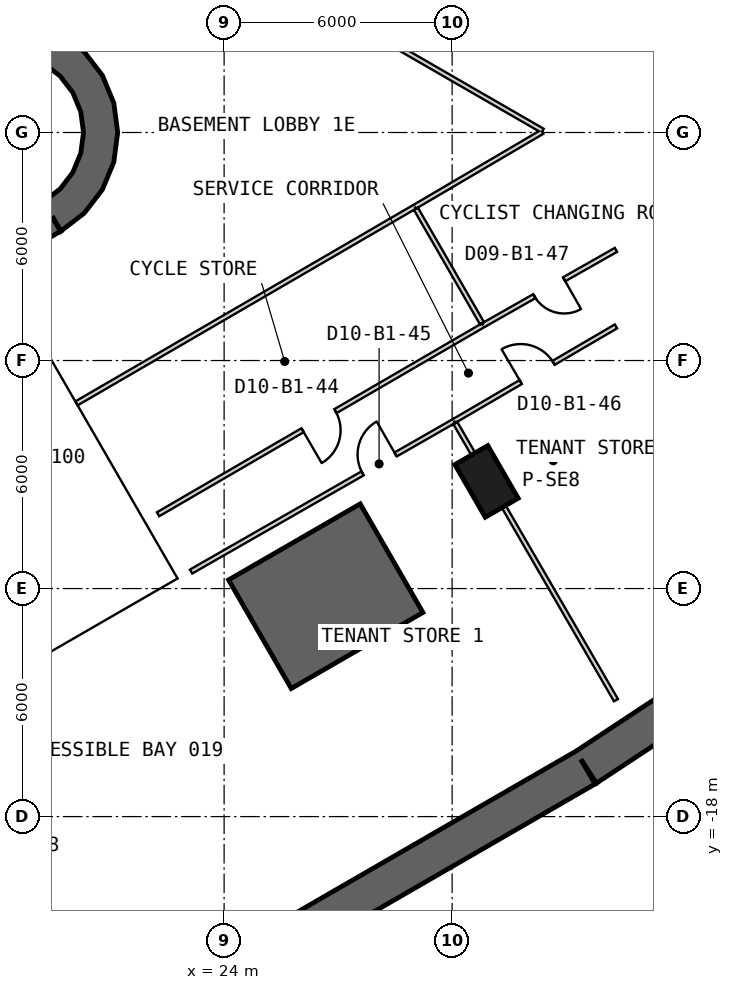
"""IFC4 building model, lengths in metres.
Left out: names, types, materials, properties, quantities, classifications, styles, units other than length and angle.
Written with IfcOpenShell. Run it as: python <this file> out.ifc"""

import sys

from ifc_helpers import new_model, si_unit, direction, frame, frame_2d, origin, origin_2d, place, context, subcontext, project, spatial, polyline, rectangle, outline, extrude, element, fill, save


model = new_model("IFC4")
c1 = context("Model", 3, precision=1e-05, world=origin(), true_north=direction((0.0, 1.0)))
c2 = subcontext(c1, "Body", "Model", "MODEL_VIEW")
j1 = project(units=[si_unit("LENGTHUNIT", "METRE"), si_unit("PLANEANGLEUNIT", "RADIAN")], contexts=[c1])
p1 = place(None, origin())
s1 = spatial("IfcSite", under=j1, at=p1, CompositionType="ELEMENT")
p2 = place(p1, origin())
s2 = spatial("IfcBuilding", under=s1, at=p2, CompositionType="ELEMENT")
p3 = place(p2, frame((0.0, 0.0, -5.5)))
s3 = spatial("IfcBuildingStorey", under=s2, at=p3, CompositionType="ELEMENT", Elevation=-5.5)
p4 = place(p3, frame((45.325, -8.924, 0.0), z_axis=(0.0, 0.0, 1.0), x_axis=(-0.834959286921, -0.550311720014, 0.0)))
e1 = element("IfcWall", 1, at=p4, inside=s3, PredefinedType="SHEAR", context=c2, shape_type="SweptSolid", body=[
    extrude(rectangle(XDim=14.134, YDim=1.0, at=frame_2d((7.067, 0.0))), origin(), (0.0, 0.0, 1.0), 5.5),
])
p5 = place(p3, frame((33.512, -16.71, 0.0), z_axis=(0.0, 0.0, 1.0), x_axis=(-0.865991212225, -0.500059216843, 0.0)))
e2 = element("IfcWall", 2, at=p5, inside=s3, PredefinedType="SHEAR", context=c2, shape_type="SweptSolid", body=[
    extrude(rectangle(XDim=41.333, YDim=1.0, at=frame_2d((20.667, 0.0))), origin(), (0.0, 0.0, 1.0), 5.5),
])
p6 = place(p3, frame((30.905, -9.181, 0.0), z_axis=(0.0, 0.0, 1.0), x_axis=(0.5, -0.866025403784, 0.0)))
e3 = element("IfcColumn", 3, at=p6, inside=s3, PredefinedType="COLUMN", context=c2, shape_type="SweptSolid", body=[
    extrude(rectangle(XDim=1.6, YDim=1.0, at=origin_2d()), origin(), (0.0, 0.0, 1.0), 5.5),
])
p7 = place(p3, frame((19.475, 2.208, 0.0), z_axis=(0.0, 0.0, 1.0), x_axis=(-0.866028369851, 0.499994862586, 0.0)))
e4 = element("IfcWall", 4, at=p7, inside=s3, PredefinedType="SHEAR", context=c2, shape_type="SweptSolid", body=[
    extrude(rectangle(XDim=31.523, YDim=0.9, at=frame_2d((15.762, 0.0))), origin(), (0.0, 0.0, 1.0), 5.5),
])
p8 = place(p7, frame((3.612, 0.0, 0.0)))
e5 = element("IfcOpeningElement", 5, at=p8, cuts=e4, PredefinedType="OPENING", context=c2, shape_type="SweptSolid", body=[
    extrude(rectangle(XDim=1.2, YDim=2.4, at=frame_2d((0.6, 1.2))), frame((0.0, 0.46, 0.0), z_axis=(0.0, -1.0, 0.0), x_axis=(1.0, 0.0, 0.0)), (0.0, 0.0, 1.0), 0.92),
])
p9 = place(p7, frame((26.712, 0.0, 0.0)))
e6 = element("IfcOpeningElement", 6, at=p9, cuts=e4, PredefinedType="OPENING", context=c2, shape_type="SweptSolid", body=[
    extrude(rectangle(XDim=1.2, YDim=2.4, at=frame_2d((0.6, 1.2))), frame((0.0, 0.46, 0.0), z_axis=(0.0, -1.0, 0.0), x_axis=(1.0, 0.0, 0.0)), (0.0, 0.0, 1.0), 0.92),
])
p10 = place(p3, frame((-7.825, -17.97, 0.0), z_axis=(0.0, 0.0, 1.0), x_axis=(0.866028369851, 0.499994862586, 0.0)))
e7 = element("IfcWall", 7, at=p10, inside=s3, PredefinedType="SHEAR", context=c2, shape_type="SweptSolid", body=[
    extrude(rectangle(XDim=31.523, YDim=0.9, at=frame_2d((15.762, 0.0))), origin(), (0.0, 0.0, 1.0), 5.5),
])
p11 = place(p10, frame((17.862, 0.0, 0.0)))
e8 = element("IfcOpeningElement", 8, at=p11, cuts=e7, PredefinedType="OPENING", context=c2, shape_type="SweptSolid", body=[
    extrude(rectangle(XDim=1.2, YDim=2.4, at=frame_2d((0.6, 1.2))), frame((0.0, 0.46, 0.0), z_axis=(0.0, -1.0, 0.0), x_axis=(1.0, 0.0, 0.0)), (0.0, 0.0, 1.0), 0.92),
])
p12 = place(p10, frame((20.562, 0.0, 0.0)))
e9 = element("IfcOpeningElement", 9, at=p12, cuts=e7, PredefinedType="OPENING", context=c2, shape_type="SweptSolid", body=[
    extrude(rectangle(XDim=1.2, YDim=2.4, at=frame_2d((0.6, 1.2))), frame((0.0, 0.46, 0.0), z_axis=(0.0, -1.0, 0.0), x_axis=(1.0, 0.0, 0.0)), (0.0, 0.0, 1.0), 0.92),
])
p13 = place(p10, frame((26.712, 0.0, 0.0)))
e10 = element("IfcOpeningElement", 10, at=p13, cuts=e7, PredefinedType="OPENING", context=c2, shape_type="SweptSolid", body=[
    extrude(rectangle(XDim=1.2, YDim=2.4, at=frame_2d((0.6, 1.2))), frame((0.0, 0.46, 0.0), z_axis=(0.0, -1.0, 0.0), x_axis=(1.0, 0.0, 0.0)), (0.0, 0.0, 1.0), 0.92),
])
p14 = place(p10, frame((3.612, 0.0, 0.0)))
e11 = element("IfcOpeningElement", 11, at=p14, cuts=e7, PredefinedType="OPENING", context=c2, shape_type="SweptSolid", body=[
    extrude(rectangle(XDim=1.2, YDim=2.4, at=frame_2d((0.6, 1.2))), frame((0.0, 0.46, 0.0), z_axis=(0.0, -1.0, 0.0), x_axis=(1.0, 0.0, 0.0)), (0.0, 0.0, 1.0), 0.92),
])
p15 = place(p3, origin())
e12 = element("IfcWall", 12, at=p15, inside=s3, PredefinedType="SHEAR", context=c2, shape_type="SweptSolid", body=[
    extrude(outline(polyline([(19.7, -2.598), (20.321, -2.121), (20.798, -1.5), (21.098, -0.777), (21.2, 0.0), (21.098, 0.777), (20.798, 1.5), (20.321, 2.121), (19.7, 2.598), (19.25, 1.819), (19.685, 1.485), (20.019, 1.05), (20.229, 0.543), (20.3, 0.0), (20.229, -0.543), (20.019, -1.05), (19.685, -1.485), (19.25, -1.819), (19.7, -2.598)])), origin(), (0.0, 0.0, 1.0), 5.5),
])
p16 = place(p3, origin())
e13 = element("IfcWall", 13, at=p16, inside=s3, PredefinedType="SHEAR", context=c2, shape_type="SweptSolid", body=[
    extrude(outline(polyline([(25.767, -14.63), (29.231, -12.63), (27.581, -9.772), (24.117, -11.772), (25.767, -14.63)])), origin(), (0.0, 0.0, 1.0), 5.5),
])
p17 = place(p3, frame((20.115, -7.128, 0.0), z_axis=(0.0, 0.0, 1.0), x_axis=(0.864567321734, 0.502517010847, 0.0)))
e14 = element("IfcWall", 14, at=p17, inside=s3, PredefinedType="PARTITIONING", context=c2, shape_type="SweptSolid", body=[
    extrude(rectangle(XDim=10.296, YDim=0.12, at=frame_2d((5.148, 0.0))), origin(), (0.0, 0.0, 1.0), 4.18),
])
p18 = place(p3, frame((32.38, 0.046, 0.0), z_axis=(0.0, 0.0, 1.0), x_axis=(-0.86611360534, 0.499847199298, 0.0)))
e15 = element("IfcWall", 15, at=p18, inside=s3, PredefinedType="PARTITIONING", context=c2, shape_type="SweptSolid", body=[
    extrude(rectangle(XDim=56.078, YDim=0.12, at=frame_2d((28.039, 0.0))), origin(), (0.0, 0.0, 1.0), 4.07),
])
p19 = place(p18, frame((30.481, 0.0, 0.0)))
e16 = element("IfcOpeningElement", 16, at=p19, cuts=e15, PredefinedType="OPENING", context=c2, shape_type="SweptSolid", body=[
    extrude(rectangle(XDim=1.2, YDim=2.4, at=frame_2d((0.6, 1.2))), frame((0.0, 0.07, 0.0), z_axis=(0.0, -1.0, 0.0), x_axis=(1.0, 0.0, 0.0)), (0.0, 0.0, 1.0), 0.14),
])
p20 = place(p18, frame((10.481, 0.0, 0.0)))
e17 = element("IfcOpeningElement", 17, at=p20, cuts=e15, PredefinedType="OPENING", context=c2, shape_type="SweptSolid", body=[
    extrude(rectangle(XDim=1.2, YDim=2.4, at=frame_2d((0.6, 1.2))), frame((0.0, 0.07, 0.0), z_axis=(0.0, -1.0, 0.0), x_axis=(1.0, 0.0, 0.0)), (0.0, 0.0, 1.0), 0.14),
])
p21 = place(p18, frame((45.282, 0.0, 0.0)))
e18 = element("IfcOpeningElement", 18, at=p21, cuts=e15, PredefinedType="OPENING", context=c2, shape_type="SweptSolid", body=[
    extrude(rectangle(XDim=0.9, YDim=2.1, at=frame_2d((0.45, 1.05))), frame((0.0, 0.07, 0.0), z_axis=(0.0, -1.0, 0.0), x_axis=(1.0, 0.0, 0.0)), (0.0, 0.0, 1.0), 0.14),
])
p22 = place(p18, frame((52.061, 0.0, 0.0)))
e19 = element("IfcOpeningElement", 19, at=p22, cuts=e15, PredefinedType="OPENING", context=c2, shape_type="SweptSolid", body=[
    extrude(rectangle(XDim=1.0, YDim=2.1, at=frame_2d((0.5, 1.05))), frame((0.0, 0.07, 0.0), z_axis=(0.0, -1.0, 0.0), x_axis=(1.0, 0.0, 0.0)), (0.0, 0.0, 1.0), 0.14),
])
p23 = place(p3, frame((29.017, -1.953, 0.0), z_axis=(0.0, 0.0, 1.0), x_axis=(0.86215357335, 0.506647032912, 0.0)))
e20 = element("IfcWall", 20, at=p23, inside=s3, PredefinedType="PARTITIONING", context=c2, shape_type="SweptSolid", body=[
    extrude(rectangle(XDim=3.89, YDim=0.12, at=frame_2d((1.945, 0.0))), origin(), (0.0, 0.0, 1.0), 4.07),
])
p24 = place(p3, frame((30.817, -5.071, 0.0), z_axis=(0.0, 0.0, 1.0), x_axis=(-0.86452239291, -0.502594301756, 0.0)))
e21 = element("IfcWall", 21, at=p24, inside=s3, PredefinedType="PARTITIONING", context=c2, shape_type="SweptSolid", body=[
    extrude(rectangle(XDim=9.896, YDim=0.12, at=frame_2d((4.948, 0.0))), origin(), (0.0, 0.0, 1.0), 4.28),
])
p25 = place(p24, frame((4.496, 0.0, 0.0)))
e22 = element("IfcOpeningElement", 22, at=p25, cuts=e21, PredefinedType="OPENING", context=c2, shape_type="SweptSolid", body=[
    extrude(rectangle(XDim=1.0, YDim=2.1, at=frame_2d((0.5, 1.05))), frame((0.0, 0.07, 0.0), z_axis=(0.0, -1.0, 0.0), x_axis=(1.0, 0.0, 0.0)), (0.0, 0.0, 1.0), 0.14),
])
p26 = place(p3, frame((34.311, -3.088, 0.0), z_axis=(0.0, 0.0, 1.0), x_axis=(-0.869731025912, -0.493526030282, 0.0)))
e23 = element("IfcWall", 23, at=p26, inside=s3, PredefinedType="PARTITIONING", context=c2, shape_type="SweptSolid", body=[
    extrude(rectangle(XDim=4.018, YDim=0.12, at=frame_2d((2.009, 0.0))), origin(), (0.0, 0.0, 1.0), 4.18),
])
p27 = place(p26, frame((1.568, 0.0, 0.0)))
e24 = element("IfcOpeningElement", 24, at=p27, cuts=e23, PredefinedType="OPENING", context=c2, shape_type="SweptSolid", body=[
    extrude(rectangle(XDim=0.9, YDim=2.1, at=frame_2d((0.45, 1.05))), frame((0.0, 0.07, 0.0), z_axis=(0.0, -1.0, 0.0), x_axis=(1.0, 0.0, 0.0)), (0.0, 0.0, 1.0), 0.14),
])
p28 = place(p3, frame((23.131, -11.552, 0.0), z_axis=(0.0, 0.0, 1.0), x_axis=(0.867873663881, 0.496784967106, 0.0)))
e25 = element("IfcWall", 25, at=p28, inside=s3, PredefinedType="PARTITIONING", context=c2, shape_type="SweptSolid", body=[
    extrude(rectangle(XDim=7.975, YDim=0.12, at=frame_2d((3.988, 0.0))), origin(), (0.0, 0.0, 1.0), 4.28),
])
p29 = place(p28, frame((5.2, 0.0, 0.0)))
e26 = element("IfcOpeningElement", 26, at=p29, cuts=e25, PredefinedType="OPENING", context=c2, shape_type="SweptSolid", body=[
    extrude(rectangle(XDim=1.0, YDim=2.1, at=frame_2d((0.5, 1.05))), frame((0.0, 0.07, 0.0), z_axis=(0.0, -1.0, 0.0), x_axis=(1.0, 0.0, 0.0)), (0.0, 0.0, 1.0), 0.14),
])
p30 = place(p3, frame((30.053, -7.591, 0.0), z_axis=(0.0, 0.0, 1.0), x_axis=(0.863392666074, 0.504532560069, 0.0)))
e27 = element("IfcWall", 27, at=p30, inside=s3, PredefinedType="PARTITIONING", context=c2, shape_type="SweptSolid", body=[
    extrude(rectangle(XDim=4.932, YDim=0.12, at=frame_2d((2.466, 0.0))), origin(), (0.0, 0.0, 1.0), 4.18),
])
p31 = place(p30, frame((2.03, 0.0, 0.0)))
e28 = element("IfcOpeningElement", 28, at=p31, cuts=e27, PredefinedType="OPENING", context=c2, shape_type="SweptSolid", body=[
    extrude(rectangle(XDim=1.0, YDim=2.1, at=frame_2d((0.5, 1.05))), frame((0.0, 0.07, 0.0), z_axis=(0.0, -1.0, 0.0), x_axis=(1.0, 0.0, 0.0)), (0.0, 0.0, 1.0), 0.14),
])
p32 = place(p3, frame((30.786, -5.019, 0.0), z_axis=(0.0, 0.0, 1.0), x_axis=(-0.499979528911, 0.866037222451, 0.0)))
e29 = element("IfcWall", 29, at=p32, inside=s3, PredefinedType="PARTITIONING", context=c2, shape_type="SweptSolid", body=[
    extrude(rectangle(XDim=3.48, YDim=0.12, at=frame_2d((1.74, 0.0))), origin(), (0.0, 0.0, 1.0), 4.18),
])
p33 = place(p3, frame((34.311, -14.937, 0.0), z_axis=(0.0, 0.0, 1.0), x_axis=(-0.501530435632, 0.865140001465, 0.0)))
e30 = element("IfcWall", 30, at=p33, inside=s3, PredefinedType="PARTITIONING", context=c2, shape_type="SweptSolid", body=[
    extrude(rectangle(XDim=8.431, YDim=0.12, at=frame_2d((4.216, 0.0))), origin(), (0.0, 0.0, 1.0), 5.1),
])
p34 = place(p25, origin())
e31 = element("IfcDoor", 31, at=p34, inside=s3, OperationType="SINGLE_SWING_RIGHT", PredefinedType="NOTDEFINED", context=c2, shape_type="SweptSolid", body=[
    extrude(rectangle(XDim=1.0, YDim=2.1, at=frame_2d((0.5, 1.05))), frame((0.0, 0.025, 0.0), z_axis=(0.0, -1.0, 0.0), x_axis=(1.0, 0.0, 0.0)), (0.0, 0.0, 1.0), 0.05),
])
fill(e22, e31)
p35 = place(p29, origin())
e32 = element("IfcDoor", 32, at=p35, inside=s3, OperationType="SINGLE_SWING_RIGHT", PredefinedType="NOTDEFINED", context=c2, shape_type="SweptSolid", body=[
    extrude(rectangle(XDim=1.0, YDim=2.1, at=frame_2d((0.5, 1.05))), frame((0.0, 0.025, 0.0), z_axis=(0.0, -1.0, 0.0), x_axis=(1.0, 0.0, 0.0)), (0.0, 0.0, 1.0), 0.05),
])
fill(e26, e32)
p36 = place(p31, origin())
e33 = element("IfcDoor", 33, at=p36, inside=s3, OperationType="SINGLE_SWING_LEFT", PredefinedType="NOTDEFINED", context=c2, shape_type="SweptSolid", body=[
    extrude(rectangle(XDim=1.0, YDim=2.1, at=frame_2d((0.5, 1.05))), frame((0.0, 0.025, 0.0), z_axis=(0.0, -1.0, 0.0), x_axis=(1.0, 0.0, 0.0)), (0.0, 0.0, 1.0), 0.05),
])
fill(e28, e33)
p37 = place(p27, origin())
e34 = element("IfcDoor", 34, at=p37, inside=s3, OperationType="SINGLE_SWING_LEFT", PredefinedType="NOTDEFINED", context=c2, shape_type="SweptSolid", body=[
    extrude(rectangle(XDim=0.9, YDim=2.1, at=frame_2d((0.45, 1.05))), frame((0.0, 0.025, 0.0), z_axis=(0.0, -1.0, 0.0), x_axis=(1.0, 0.0, 0.0)), (0.0, 0.0, 1.0), 0.05),
])
fill(e24, e34)
save(model, sys.argv[1])
